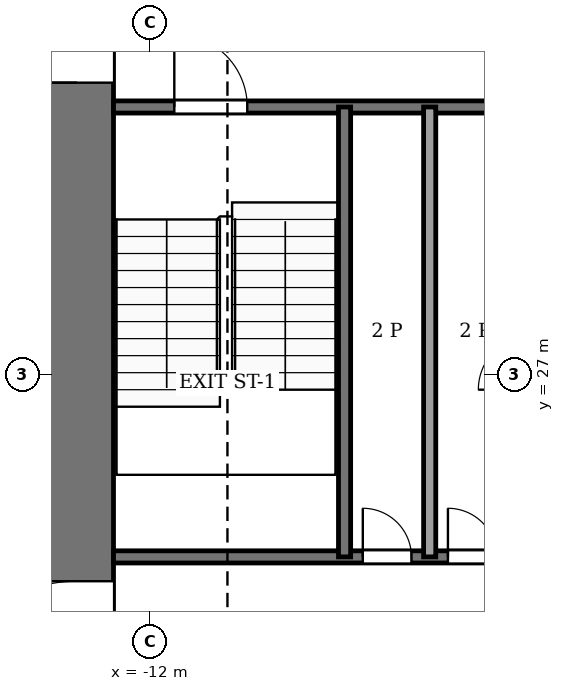
"""IFC4 building model, lengths in metres.
Left out: names, types, materials, properties, quantities, classifications, styles, units other than length and angle.
Written with IfcOpenShell. Run it as: python <this file> out.ifc"""

import sys

from ifc_helpers import new_model, si_unit, direction, frame, frame_2d, origin, place, context, subcontext, project, spatial, rectangle, extrude, element, fill, save


model = new_model("IFC4")
c1 = context("Model", 3, precision=1e-05, world=origin(), true_north=direction((0.0, 1.0)))
c2 = subcontext(c1, "Body", "Model", "MODEL_VIEW")
j1 = project(units=[si_unit("LENGTHUNIT", "METRE"), si_unit("PLANEANGLEUNIT", "RADIAN")], contexts=[c1])
p1 = place(None, origin())
s1 = spatial("IfcSite", under=j1, at=p1, CompositionType="ELEMENT")
p2 = place(p1, origin())
s2 = spatial("IfcBuilding", under=s1, at=p2, CompositionType="ELEMENT")
p3 = place(p2, frame((0.0, 0.0, 90.0)))
s3 = spatial("IfcBuildingStorey", under=s2, at=p3, CompositionType="ELEMENT", Elevation=90.0)
p4 = place(p3, frame((-13.2, 18.4, -0.13), z_axis=(0.0, 0.0, 1.0), x_axis=(0.0, 1.0, 0.0)))
e1 = element("IfcWall", 1, at=p4, inside=s3, PredefinedType="SHEAR", context=c2, shape_type="SweptSolid", body=[
    extrude(rectangle(XDim=19.2, YDim=1.2, at=frame_2d((9.6, 0.0))), origin(), (0.0, 0.0, 1.0), 4.0),
])
p5 = place(p4, frame((2.8, 0.0, 0.13)))
e2 = element("IfcOpeningElement", 2, at=p5, cuts=e1, PredefinedType="OPENING", context=c2, shape_type="SweptSolid", body=[
    extrude(rectangle(XDim=2.4, YDim=2.4, at=frame_2d((1.2, 1.2))), frame((0.0, 0.61, 0.0), z_axis=(0.0, -1.0, 0.0), x_axis=(1.0, 0.0, 0.0)), (0.0, 0.0, 1.0), 1.22),
])
p6 = place(p4, frame((13.4, 0.0, 0.13)))
e3 = element("IfcOpeningElement", 3, at=p6, cuts=e1, PredefinedType="OPENING", context=c2, shape_type="SweptSolid", body=[
    extrude(rectangle(XDim=1.4, YDim=2.2, at=frame_2d((0.7, 1.1))), frame((0.0, 0.61, 0.0), z_axis=(0.0, -1.0, 0.0), x_axis=(1.0, 0.0, 0.0)), (0.0, 0.0, 1.0), 1.22),
])
p7 = place(p3, frame((-12.6, 24.0, 0.0), z_axis=(0.0, 0.0, 1.0), x_axis=(1.0, 0.0, 0.0)))
e4 = element("IfcWall", 4, at=p7, inside=s3, PredefinedType="PARTITIONING", context=c2, shape_type="SweptSolid", body=[
    extrude(rectangle(XDim=6.6, YDim=0.2, at=frame_2d((3.3, 0.0))), origin(), (0.0, 0.0, 1.0), 3.87),
])
p8 = place(p7, frame((4.1, 0.0, 0.0)))
e5 = element("IfcOpeningElement", 5, at=p8, cuts=e4, PredefinedType="OPENING", context=c2, shape_type="SweptSolid", body=[
    extrude(rectangle(XDim=0.8, YDim=2.1, at=frame_2d((0.4, 1.05))), frame((0.0, 0.11, 0.0), z_axis=(0.0, -1.0, 0.0), x_axis=(1.0, 0.0, 0.0)), (0.0, 0.0, 1.0), 0.22),
])
p9 = place(p7, frame((5.5, 0.0, 0.0)))
e6 = element("IfcOpeningElement", 6, at=p9, cuts=e4, PredefinedType="OPENING", context=c2, shape_type="SweptSolid", body=[
    extrude(rectangle(XDim=0.8, YDim=2.1, at=frame_2d((0.4, 1.05))), frame((0.0, 0.11, 0.0), z_axis=(0.0, -1.0, 0.0), x_axis=(1.0, 0.0, 0.0)), (0.0, 0.0, 1.0), 0.22),
])
p10 = place(p3, frame((-12.6, 31.4, 0.0), z_axis=(0.0, 0.0, 1.0), x_axis=(1.0, 0.0, 0.0)))
e7 = element("IfcWall", 7, at=p10, inside=s3, PredefinedType="PARTITIONING", context=c2, shape_type="SweptSolid", body=[
    extrude(rectangle(XDim=6.6, YDim=0.2, at=frame_2d((3.3, 0.0))), origin(), (0.0, 0.0, 1.0), 3.87),
])
p11 = place(p10, frame((1.0, 0.0, 0.0)))
e8 = element("IfcOpeningElement", 8, at=p11, cuts=e7, PredefinedType="OPENING", context=c2, shape_type="SweptSolid", body=[
    extrude(rectangle(XDim=1.2, YDim=2.2, at=frame_2d((0.6, 1.1))), frame((0.0, 0.11, 0.0), z_axis=(0.0, -1.0, 0.0), x_axis=(1.0, 0.0, 0.0)), (0.0, 0.0, 1.0), 0.22),
])
for number, where, z_axis, x_axis in (
    (9, (-8.8, 24.0, 0.0), (0.0, 0.0, 1.0), (0.0, 1.0, 0.0)),
    (10, (-7.4, 24.0, 0.0), (0.0, 0.0, 1.0), (0.0, 1.0, 0.0)),
):
    element("IfcWall", number, at=place(p3, frame(where, z_axis=z_axis, x_axis=x_axis)), inside=s3, PredefinedType="PARTITIONING", context=c2, shape_type="SweptSolid", body=[
        extrude(rectangle(XDim=7.4, YDim=0.2, at=frame_2d((3.7, 0.0))), origin(), (0.0, 0.0, 1.0), 3.87),
    ])
p12 = place(p8, origin())
e11 = element("IfcDoor", 11, at=p12, inside=s3, OperationType="SINGLE_SWING_LEFT", PredefinedType="DOOR", context=c2, shape_type="SweptSolid", body=[
    extrude(rectangle(XDim=0.8, YDim=2.1, at=frame_2d((0.4, 1.05))), frame((0.0, 0.025, 0.0), z_axis=(0.0, -1.0, 0.0), x_axis=(1.0, 0.0, 0.0)), (0.0, 0.0, 1.0), 0.05),
])
fill(e5, e11)
p13 = place(p9, origin())
e12 = element("IfcDoor", 12, at=p13, inside=s3, OperationType="SINGLE_SWING_RIGHT", PredefinedType="DOOR", context=c2, shape_type="SweptSolid", body=[
    extrude(rectangle(XDim=0.8, YDim=2.1, at=frame_2d((0.4, 1.05))), frame((0.0, 0.025, 0.0), z_axis=(0.0, -1.0, 0.0), x_axis=(1.0, 0.0, 0.0)), (0.0, 0.0, 1.0), 0.05),
])
fill(e6, e12)
p14 = place(p11, origin())
e13 = element("IfcDoor", 13, at=p14, inside=s3, OperationType="SINGLE_SWING_RIGHT", PredefinedType="DOOR", context=c2, shape_type="SweptSolid", body=[
    extrude(rectangle(XDim=1.2, YDim=2.2, at=frame_2d((0.6, 1.1))), frame((0.0, 0.025, 0.0), z_axis=(0.0, -1.0, 0.0), x_axis=(1.0, 0.0, 0.0)), (0.0, 0.0, 1.0), 0.05),
])
fill(e8, e13)
p15 = place(p5, origin())
e14 = element("IfcDoor", 14, at=p15, inside=s3, OperationType="DOUBLE_DOOR_SINGLE_SWING", PredefinedType="DOOR", context=c2, shape_type="SweptSolid", body=[
    extrude(rectangle(XDim=2.4, YDim=2.4, at=frame_2d((1.2, 1.2))), frame((0.0, 0.025, 0.0), z_axis=(0.0, -1.0, 0.0), x_axis=(1.0, 0.0, 0.0)), (0.0, 0.0, 1.0), 0.05),
])
fill(e2, e14)
p16 = place(p6, origin())
e15 = element("IfcDoor", 15, at=p16, inside=s3, OperationType="SINGLE_SWING_RIGHT", PredefinedType="DOOR", context=c2, shape_type="SweptSolid", body=[
    extrude(rectangle(XDim=1.4, YDim=2.2, at=frame_2d((0.7, 1.1))), frame((0.0, 0.025, 0.0), z_axis=(0.0, -1.0, 0.0), x_axis=(1.0, 0.0, 0.0)), (0.0, 0.0, 1.0), 0.05),
])
fill(e3, e15)
save(model, sys.argv[1])
